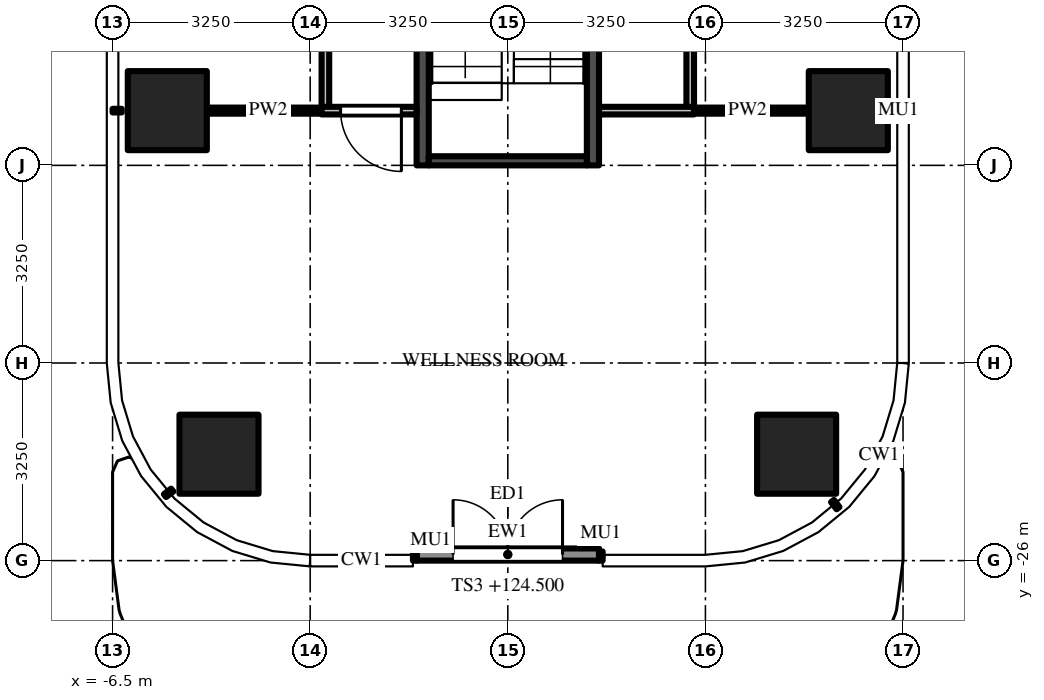
"""IFC4 building model, lengths in metres.
Left out: names, types, materials, properties, quantities, classifications, styles, units other than length and angle.
Written with IfcOpenShell. Run it as: python <this file> out.ifc"""

import sys

from ifc_helpers import new_model, si_unit, direction, frame, frame_2d, origin, origin_2d, place, context, subcontext, project, spatial, rectangle, extrude, source, transform, mapped, element, fill, save


model = new_model("IFC4")
c1 = context("Model", 3, precision=1e-05, world=origin(), true_north=direction((0.0, 1.0)))
c2 = subcontext(c1, "Body", "Model", "MODEL_VIEW")
j1 = project(units=[si_unit("LENGTHUNIT", "METRE"), si_unit("PLANEANGLEUNIT", "RADIAN")], contexts=[c1])
p1 = place(None, origin())
s1 = spatial("IfcSite", under=j1, at=p1, CompositionType="ELEMENT")
p2 = place(p1, origin())
s2 = spatial("IfcBuilding", under=s1, at=p2, CompositionType="ELEMENT")
p3 = place(p2, frame((0.0, 0.0, 124.5)))
s3 = spatial("IfcBuildingStorey", under=s2, at=p3, CompositionType="ELEMENT", Elevation=124.5)
m1 = source(origin(), c2, "Body", "SweptSolid", [
    extrude(rectangle(XDim=1.3, YDim=1.3, at=origin_2d()), origin(), (0.0, 0.0, 1.0), 4.5),
])
for number, where, z_axis, x_axis in (
    (1, (5.6, -18.6, 0.0), (0.0, 0.0, 1.0), (1.0, 0.0, 0.0)),
    (2, (4.75, -24.25, 0.0), (0.0, 0.0, 1.0), (1.0, 0.0, 0.0)),
    (3, (-5.6, -18.6, 0.0), (0.0, 0.0, 1.0), (1.0, 0.0, 0.0)),
    (4, (-4.75, -24.25, 0.0), (0.0, 0.0, 1.0), (1.0, 0.0, 0.0)),
):
    element("IfcColumn", number, at=place(p3, frame(where, z_axis=z_axis, x_axis=x_axis)), inside=s3, PredefinedType="COLUMN", context=c2, shape_type="MappedRepresentation", body=[
        mapped(m1, transform((0.0, 0.0, 0.0))),
    ])
m2 = source(origin(), c2, "Body", "SweptSolid", [
    extrude(rectangle(XDim=6.0, YDim=0.2, at=frame_2d((3.0, 0.0))), origin(), (0.0, 0.0, 1.0), 4.25),
])
for number, where, z_axis, x_axis in (
    (5, (1.4, -13.5, 0.0), (0.0, 0.0, 1.0), (0.0, -1.0, 0.0)),
    (6, (-1.4, -13.5, 0.0), (0.0, 0.0, 1.0), (0.0, -1.0, 0.0)),
):
    element("IfcWall", number, at=place(p3, frame(where, z_axis=z_axis, x_axis=x_axis)), inside=s3, PredefinedType="SHEAR", context=c2, shape_type="MappedRepresentation", body=[
        mapped(m2, transform((0.0, 0.0, 0.0))),
    ])
m3 = source(origin(), c2, "Body", "SweptSolid", [
    extrude(rectangle(XDim=2.6, YDim=0.15, at=frame_2d((1.3, 0.0))), origin(), (0.0, 0.0, 1.0), 4.25),
])
p4 = place(p3, frame((1.3, -19.425, 0.0), z_axis=(0.0, 0.0, 1.0), x_axis=(-1.0, 0.0, 0.0)))
e7 = element("IfcWall", 7, at=p4, inside=s3, PredefinedType="SHEAR", context=c2, shape_type="MappedRepresentation", body=[
    mapped(m3, transform((0.0, 0.0, 0.0))),
])
m4 = source(origin(), c2, "Body", "SweptSolid", [
    extrude(rectangle(XDim=3.0, YDim=0.2, at=frame_2d((1.5, 0.0))), origin(), (0.0, 0.0, 1.0), 4.25),
])
p5 = place(p3, frame((-1.5, -25.9, 0.0), z_axis=(0.0, 0.0, 1.0), x_axis=(1.0, 0.0, 0.0)))
e8 = element("IfcWall", 8, at=p5, inside=s3, PredefinedType="SOLIDWALL", context=c2, shape_type="MappedRepresentation", body=[
    mapped(m4, transform((0.0, 0.0, 0.0))),
])
m5 = source(origin(), c2, "Body", "SweptSolid", [
    extrude(rectangle(XDim=1.8, YDim=2.4, at=frame_2d((0.9, 1.2))), frame((0.0, 0.11, 0.0), z_axis=(0.0, -1.0, 0.0), x_axis=(1.0, 0.0, 0.0)), (0.0, 0.0, 1.0), 0.22),
])
p6 = place(p5, frame((0.6, 0.0, 0.0)))
e9 = element("IfcOpeningElement", 9, at=p6, cuts=e8, PredefinedType="OPENING", context=c2, shape_type="MappedRepresentation", body=[
    mapped(m5, transform((0.0, 0.0, 0.0))),
])
m6 = source(origin(), c2, "Body", "SweptSolid", [
    extrude(rectangle(XDim=6.45, YDim=0.125, at=frame_2d((3.225, 0.0))), origin(), (0.0, 0.0, 1.0), 3.468),
])
p7 = place(p3, frame((-3.0, -18.55, 0.0), z_axis=(0.0, 0.0, 1.0), x_axis=(0.0, 1.0, 0.0)))
e10 = element("IfcWall", 10, at=p7, inside=s3, PredefinedType="PARTITIONING", context=c2, shape_type="MappedRepresentation", body=[
    mapped(m6, transform((0.0, 0.0, 0.0))),
])
m7 = source(origin(), c2, "Body", "SweptSolid", [
    extrude(rectangle(XDim=6.387, YDim=0.125, at=frame_2d((3.194, 0.0))), origin(), (0.0, 0.0, 1.0), 3.468),
])
p8 = place(p3, frame((3.0, -12.163, 0.0), z_axis=(0.0, 0.0, 1.0), x_axis=(0.0, -1.0, 0.0)))
e11 = element("IfcWall", 11, at=p8, inside=s3, PredefinedType="PARTITIONING", context=c2, shape_type="MappedRepresentation", body=[
    mapped(m7, transform((0.0, 0.0, 0.0))),
])
m8 = source(origin(), c2, "Body", "SweptSolid", [
    extrude(rectangle(XDim=2.012, YDim=0.1, at=frame_2d((1.006, 0.0))), origin(), (0.0, 0.0, 1.0), 3.697),
])
for number, where, z_axis, x_axis in (
    (12, (-4.95, -18.6, 0.0), (0.0, 0.0, 1.0), (1.0, 0.0, 0.0)),
    (13, (2.938, -18.6, 0.0), (0.0, 0.0, 1.0), (1.0, 0.0, 0.0)),
):
    element("IfcWall", number, at=place(p3, frame(where, z_axis=z_axis, x_axis=x_axis)), inside=s3, PredefinedType="PARTITIONING", context=c2, shape_type="MappedRepresentation", body=[
        mapped(m8, transform((0.0, 0.0, 0.0))),
    ])
m9 = source(origin(), c2, "Body", "SweptSolid", [
    extrude(rectangle(XDim=1.562, YDim=0.125, at=frame_2d((0.781, 0.0))), origin(), (0.0, 0.0, 1.0), 3.697),
])
p9 = place(p3, frame((-1.5, -18.6, 0.0), z_axis=(0.0, 0.0, 1.0), x_axis=(-1.0, 0.0, 0.0)))
e14 = element("IfcWall", 14, at=p9, inside=s3, PredefinedType="PARTITIONING", context=c2, shape_type="MappedRepresentation", body=[
    mapped(m9, transform((0.0, 0.0, 0.0))),
])
m10 = source(origin(), c2, "Body", "SweptSolid", [
    extrude(rectangle(XDim=1.0, YDim=2.1, at=frame_2d((0.5, 1.05))), frame((0.0, 0.073, 0.0), z_axis=(0.0, -1.0, 0.0), x_axis=(1.0, 0.0, 0.0)), (0.0, 0.0, 1.0), 0.145),
])
p10 = place(p9, frame((0.25, 0.0, 0.0)))
e15 = element("IfcOpeningElement", 15, at=p10, cuts=e14, PredefinedType="OPENING", context=c2, shape_type="MappedRepresentation", body=[
    mapped(m10, transform((0.0, 0.0, 0.0))),
])
p11 = place(p3, frame((3.062, -18.6, 0.0), z_axis=(0.0, 0.0, 1.0), x_axis=(-1.0, 0.0, 0.0)))
e16 = element("IfcWall", 16, at=p11, inside=s3, PredefinedType="PARTITIONING", context=c2, shape_type="MappedRepresentation", body=[
    mapped(m9, transform((0.0, 0.0, 0.0))),
])
m11 = source(origin(), c2, "Body", "SweptSolid", [
    extrude(rectangle(XDim=1.8, YDim=2.4, at=frame_2d((0.9, 1.2))), frame((0.0, 0.025, 0.0), z_axis=(0.0, -1.0, 0.0), x_axis=(1.0, 0.0, 0.0)), (0.0, 0.0, 1.0), 0.05),
])
p12 = place(p6, origin())
e17 = element("IfcDoor", 17, at=p12, inside=s3, OperationType="DOUBLE_DOOR_SINGLE_SWING", PredefinedType="DOOR", context=c2, shape_type="MappedRepresentation", body=[
    mapped(m11, transform((0.0, 0.0, 0.0))),
])
fill(e9, e17)
m12 = source(origin(), c2, "Body", "SweptSolid", [
    extrude(rectangle(XDim=1.0, YDim=2.1, at=frame_2d((0.5, 1.05))), frame((0.0, 0.025, 0.0), z_axis=(0.0, -1.0, 0.0), x_axis=(1.0, 0.0, 0.0)), (0.0, 0.0, 1.0), 0.05),
])
p13 = place(p10, origin())
e18 = element("IfcDoor", 18, at=p13, inside=s3, OperationType="SINGLE_SWING_LEFT", PredefinedType="DOOR", context=c2, shape_type="MappedRepresentation", body=[
    mapped(m12, transform((0.0, 0.0, 0.0))),
])
fill(e15, e18)
save(model, sys.argv[1])
